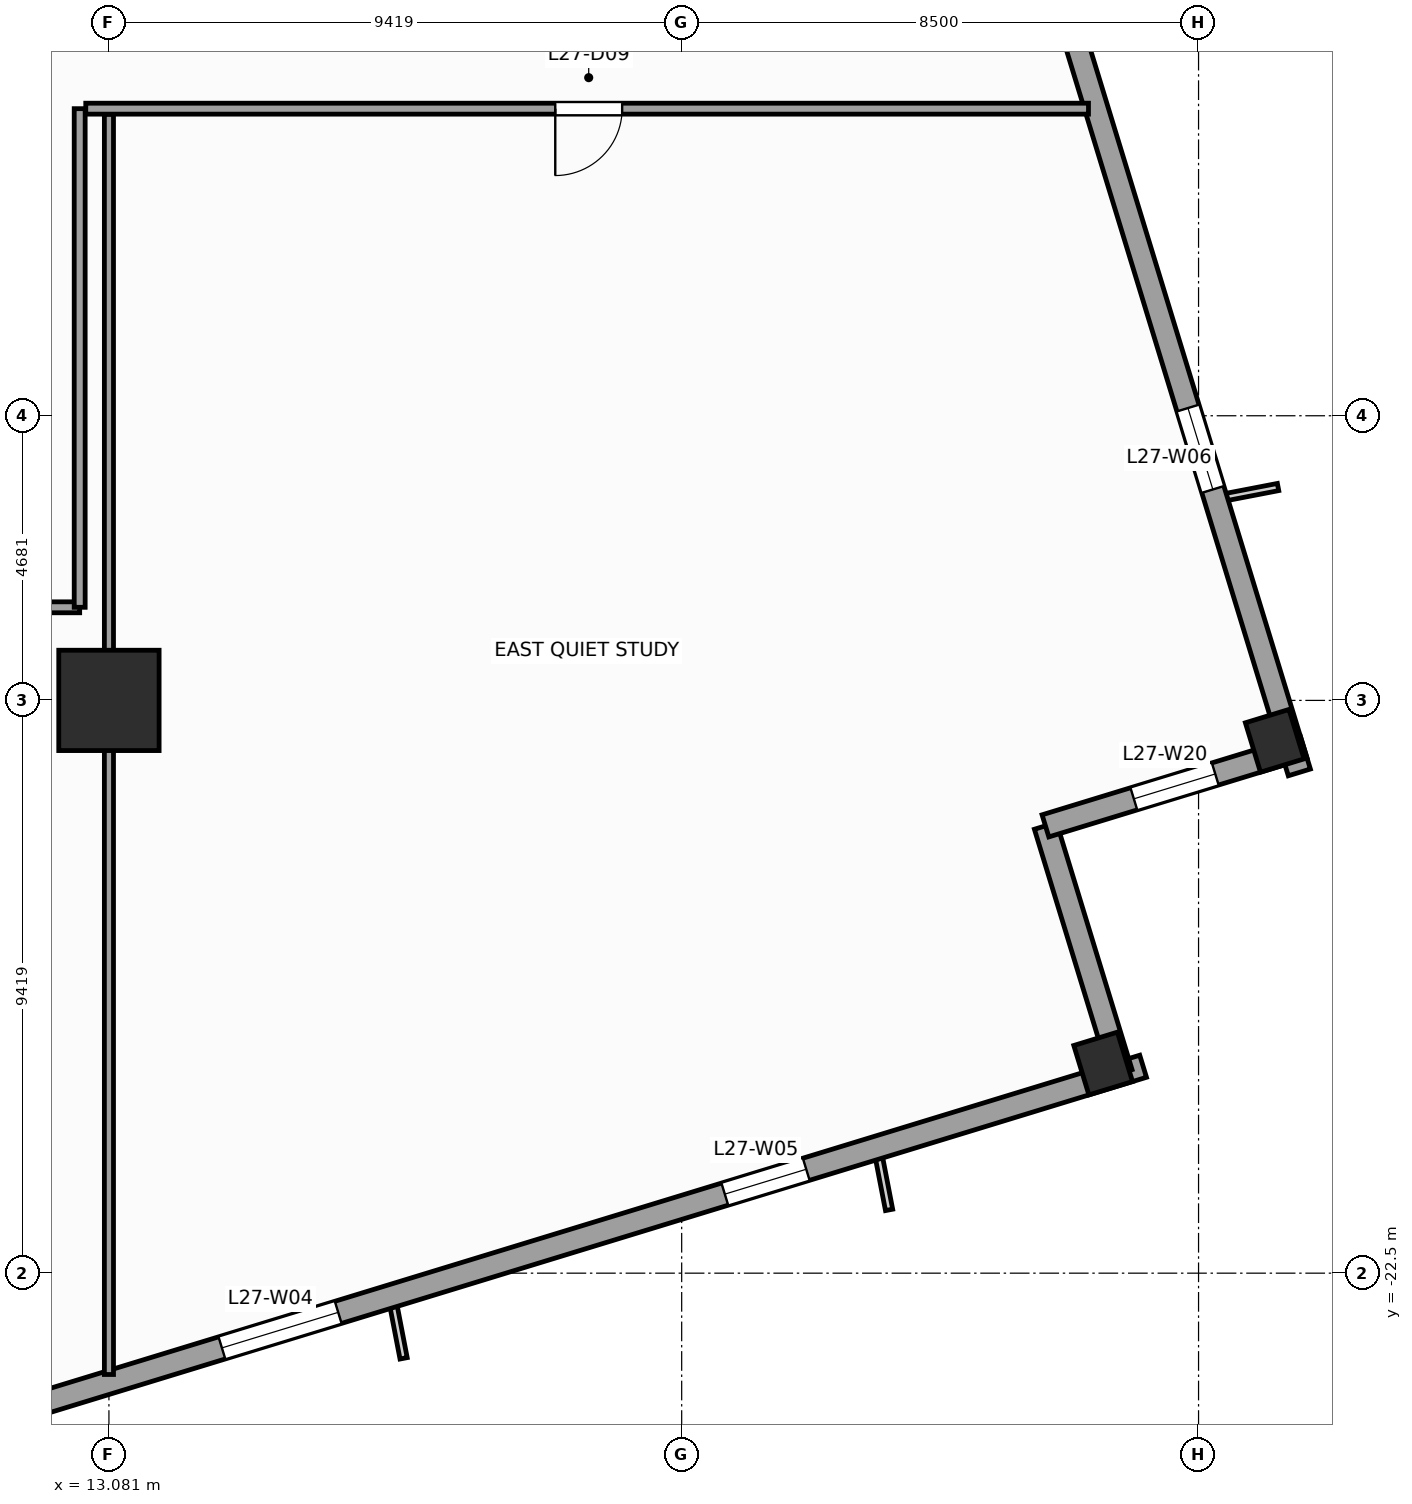
"""IFC4 building model, lengths in metres.
Left out: names, types, materials, properties, quantities, classifications, styles, units other than length and angle.
Written with IfcOpenShell. Run it as: python <this file> out.ifc"""

import sys

from ifc_helpers import new_model, si_unit, direction, frame, frame_2d, origin, origin_2d, place, context, subcontext, project, spatial, rectangle, extrude, source, transform, mapped, element, fill, save


model = new_model("IFC4")
c1 = context("Model", 3, precision=1e-05, world=origin(), true_north=direction((0.0, 1.0)))
c2 = subcontext(c1, "Body", "Model", "MODEL_VIEW")
j1 = project(units=[si_unit("LENGTHUNIT", "METRE"), si_unit("PLANEANGLEUNIT", "RADIAN")], contexts=[c1])
p1 = place(None, origin())
s1 = spatial("IfcSite", under=j1, at=p1, CompositionType="ELEMENT")
p2 = place(p1, origin())
s2 = spatial("IfcBuilding", under=s1, at=p2, CompositionType="ELEMENT")
p3 = place(p2, frame((0.0, 0.0, 115.2)))
s3 = spatial("IfcBuildingStorey", under=s2, at=p3, CompositionType="ELEMENT", Elevation=115.2)
m1 = source(origin(), c2, "Body", "SweptSolid", [
    extrude(rectangle(XDim=1.65, YDim=1.65, at=origin_2d()), origin(), (0.0, 0.0, 1.0), 4.0),
])
p4 = place(p3, frame((13.081, -13.081, 0.0), z_axis=(0.0, 0.0, 1.0), x_axis=(1.0, 0.0, 0.0)))
e1 = element("IfcColumn", 1, at=p4, inside=s3, PredefinedType="COLUMN", context=c2, shape_type="MappedRepresentation", body=[
    mapped(m1, transform((0.0, 0.0, 0.0), scale=1.0)),
])
m2 = source(origin(), c2, "Body", "SweptSolid", [
    extrude(rectangle(XDim=0.75, YDim=0.85, at=origin_2d()), origin(), (0.0, 0.0, 1.0), 4.0),
])
for number, where, z_axis, x_axis in (
    (2, (29.431, -19.052, 0.0), (0.0, 0.0, 1.0), (0.956, 0.292, 0.0)),
    (3, (32.253, -13.746, 0.0), (0.0, 0.0, 1.0), (0.956, 0.292, 0.0)),
):
    element("IfcColumn", number, at=place(p3, frame(where, z_axis=z_axis, x_axis=x_axis)), inside=s3, PredefinedType="COLUMN", context=c2, shape_type="MappedRepresentation", body=[
        mapped(m2, transform((0.0, 0.0, 0.0), scale=1.0)),
    ])
p5 = place(p3, frame((-14.265, -32.658, 0.0), z_axis=(0.0, 0.0, 1.0), x_axis=(0.956304320851, 0.292373127906, 0.0)))
e4 = element("IfcWall", 4, at=p5, inside=s3, PredefinedType="STANDARD", context=c2, shape_type="SweptSolid", body=[
    extrude(rectangle(XDim=46.38, YDim=0.38, at=frame_2d((23.19, 0.0))), origin(), (0.0, 0.0, 1.0), 3.14),
])
p6 = place(p5, frame((17.065, 0.0, 0.0)))
e5 = element("IfcOpeningElement", 5, at=p6, cuts=e4, PredefinedType="OPENING", context=c2, shape_type="SweptSolid", body=[
    extrude(rectangle(XDim=1.05, YDim=2.25, at=frame_2d((0.525, 1.125))), frame((0.0, 0.2, 0.0), z_axis=(0.0, -1.0, 0.0), x_axis=(1.0, 0.0, 0.0)), (0.0, 0.0, 1.0), 0.4),
])
p7 = place(p5, frame((4.865, 0.0, 0.51)))
e6 = element("IfcOpeningElement", 6, at=p7, cuts=e4, PredefinedType="OPENING", context=c2, shape_type="SweptSolid", body=[
    extrude(rectangle(XDim=1.4, YDim=2.4, at=frame_2d((0.7, 1.2))), frame((0.0, 0.2, 0.0), z_axis=(0.0, -1.0, 0.0), x_axis=(1.0, 0.0, 0.0)), (0.0, 0.0, 1.0), 0.4),
])
p8 = place(p5, frame((10.95, 0.0, 0.51)))
e7 = element("IfcOpeningElement", 7, at=p8, cuts=e4, PredefinedType="OPENING", context=c2, shape_type="SweptSolid", body=[
    extrude(rectangle(XDim=2.0, YDim=2.4, at=frame_2d((1.0, 1.2))), frame((0.0, 0.2, 0.0), z_axis=(0.0, -1.0, 0.0), x_axis=(1.0, 0.0, 0.0)), (0.0, 0.0, 1.0), 0.4),
])
p9 = place(p5, frame((20.512, 0.0, 0.51)))
e8 = element("IfcOpeningElement", 8, at=p9, cuts=e4, PredefinedType="OPENING", context=c2, shape_type="SweptSolid", body=[
    extrude(rectangle(XDim=2.0, YDim=2.4, at=frame_2d((1.0, 1.2))), frame((0.0, 0.2, 0.0), z_axis=(0.0, -1.0, 0.0), x_axis=(1.0, 0.0, 0.0)), (0.0, 0.0, 1.0), 0.4),
])
p10 = place(p5, frame((30.538, 0.0, 0.51)))
e9 = element("IfcOpeningElement", 9, at=p10, cuts=e4, PredefinedType="OPENING", context=c2, shape_type="SweptSolid", body=[
    extrude(rectangle(XDim=2.0, YDim=2.4, at=frame_2d((1.0, 1.2))), frame((0.0, 0.2, 0.0), z_axis=(0.0, -1.0, 0.0), x_axis=(1.0, 0.0, 0.0)), (0.0, 0.0, 1.0), 0.4),
])
p11 = place(p5, frame((39.187, 0.0, 0.51)))
e10 = element("IfcOpeningElement", 10, at=p11, cuts=e4, PredefinedType="OPENING", context=c2, shape_type="SweptSolid", body=[
    extrude(rectangle(XDim=1.4, YDim=2.4, at=frame_2d((0.7, 1.2))), frame((0.0, 0.2, 0.0), z_axis=(0.0, -1.0, 0.0), x_axis=(1.0, 0.0, 0.0)), (0.0, 0.0, 1.0), 0.4),
])
p12 = place(p3, frame((29.725, -19.208, 0.0), z_axis=(0.0, 0.0, 1.0), x_axis=(-0.292345507338, 0.956312764915, 0.0)))
e11 = element("IfcWall", 11, at=p12, inside=s3, PredefinedType="STANDARD", context=c2, shape_type="SweptSolid", body=[
    extrude(rectangle(XDim=4.25, YDim=0.38, at=frame_2d((2.125, 0.0))), origin(), (0.0, 0.0, 1.0), 3.74),
])
p13 = place(p3, frame((28.482, -15.144, 0.0), z_axis=(0.0, 0.0, 1.0), x_axis=(0.956304176051, 0.292373601522, 0.0)))
e12 = element("IfcWall", 12, at=p13, inside=s3, PredefinedType="STANDARD", context=c2, shape_type="SweptSolid", body=[
    extrude(rectangle(XDim=4.44, YDim=0.38, at=frame_2d((2.22, 0.0))), origin(), (0.0, 0.0, 1.0), 3.04),
])
p14 = place(p13, frame((1.52, 0.0, 0.51)))
e13 = element("IfcOpeningElement", 13, at=p14, cuts=e12, PredefinedType="OPENING", context=c2, shape_type="SweptSolid", body=[
    extrude(rectangle(XDim=1.4, YDim=2.4, at=frame_2d((0.7, 1.2))), frame((0.0, 0.2, 0.0), z_axis=(0.0, -1.0, 0.0), x_axis=(1.0, 0.0, 0.0)), (0.0, 0.0, 1.0), 0.4),
])
p15 = place(p3, frame((32.658, -14.265, 0.0), z_axis=(0.0, 0.0, 1.0), x_axis=(-0.292373127906, 0.956304320851, 0.0)))
e14 = element("IfcWall", 14, at=p15, inside=s3, PredefinedType="STANDARD", context=c2, shape_type="SweptSolid", body=[
    extrude(rectangle(XDim=46.38, YDim=0.38, at=frame_2d((23.19, 0.0))), origin(), (0.0, 0.0, 1.0), 3.14),
])
p16 = place(p15, frame((4.865, 0.0, 0.51)))
e15 = element("IfcOpeningElement", 15, at=p16, cuts=e14, PredefinedType="OPENING", context=c2, shape_type="SweptSolid", body=[
    extrude(rectangle(XDim=1.4, YDim=2.4, at=frame_2d((0.7, 1.2))), frame((0.0, 0.2, 0.0), z_axis=(0.0, -1.0, 0.0), x_axis=(1.0, 0.0, 0.0)), (0.0, 0.0, 1.0), 0.4),
])
p17 = place(p15, frame((14.7, 0.0, 0.51)))
e16 = element("IfcOpeningElement", 16, at=p17, cuts=e14, PredefinedType="OPENING", context=c2, shape_type="SweptSolid", body=[
    extrude(rectangle(XDim=2.0, YDim=2.4, at=frame_2d((1.0, 1.2))), frame((0.0, 0.2, 0.0), z_axis=(0.0, -1.0, 0.0), x_axis=(1.0, 0.0, 0.0)), (0.0, 0.0, 1.0), 0.4),
])
p18 = place(p15, frame((20.512, 0.0, 0.51)))
e17 = element("IfcOpeningElement", 17, at=p18, cuts=e14, PredefinedType="OPENING", context=c2, shape_type="SweptSolid", body=[
    extrude(rectangle(XDim=2.0, YDim=2.4, at=frame_2d((1.0, 1.2))), frame((0.0, 0.2, 0.0), z_axis=(0.0, -1.0, 0.0), x_axis=(1.0, 0.0, 0.0)), (0.0, 0.0, 1.0), 0.4),
])
p19 = place(p15, frame((30.538, 0.0, 0.51)))
e18 = element("IfcOpeningElement", 18, at=p19, cuts=e14, PredefinedType="OPENING", context=c2, shape_type="SweptSolid", body=[
    extrude(rectangle(XDim=2.0, YDim=2.4, at=frame_2d((1.0, 1.2))), frame((0.0, 0.2, 0.0), z_axis=(0.0, -1.0, 0.0), x_axis=(1.0, 0.0, 0.0)), (0.0, 0.0, 1.0), 0.4),
])
p20 = place(p15, frame((39.187, 0.0, 0.51)))
e19 = element("IfcOpeningElement", 19, at=p20, cuts=e14, PredefinedType="OPENING", context=c2, shape_type="SweptSolid", body=[
    extrude(rectangle(XDim=1.4, YDim=2.4, at=frame_2d((0.7, 1.2))), frame((0.0, 0.2, 0.0), z_axis=(0.0, -1.0, 0.0), x_axis=(1.0, 0.0, 0.0)), (0.0, 0.0, 1.0), 0.4),
])
p21 = place(p3, frame((1.15, -11.55, 0.0), z_axis=(0.0, 0.0, 1.0), x_axis=(1.0, 0.0, 0.0)))
e20 = element("IfcWall", 20, at=p21, inside=s3, PredefinedType="PARTITIONING", context=c2, shape_type="SweptSolid", body=[
    extrude(rectangle(XDim=11.45, YDim=0.18, at=frame_2d((5.725, 0.0))), origin(), (0.0, 0.0, 1.0), 3.74),
])
p22 = place(p21, frame((5.0, 0.0, 0.0)))
e21 = element("IfcOpeningElement", 21, at=p22, cuts=e20, PredefinedType="OPENING", context=c2, shape_type="SweptSolid", body=[
    extrude(rectangle(XDim=1.1, YDim=2.2, at=frame_2d((0.55, 1.1))), frame((0.0, 0.1, 0.0), z_axis=(0.0, -1.0, 0.0), x_axis=(1.0, 0.0, 0.0)), (0.0, 0.0, 1.0), 0.2),
])
p23 = place(p21, frame((8.736, 0.0, 0.0)))
e22 = element("IfcOpeningElement", 22, at=p23, cuts=e20, PredefinedType="OPENING", context=c2, shape_type="SweptSolid", body=[
    extrude(rectangle(XDim=1.1, YDim=2.2, at=frame_2d((0.55, 1.1))), frame((0.0, 0.1, 0.0), z_axis=(0.0, -1.0, 0.0), x_axis=(1.0, 0.0, 0.0)), (0.0, 0.0, 1.0), 0.2),
])
p24 = place(p3, frame((12.6, -11.55, 0.0), z_axis=(0.0, 0.0, 1.0), x_axis=(0.0, 1.0, 0.0)))
e23 = element("IfcWall", 23, at=p24, inside=s3, PredefinedType="PARTITIONING", context=c2, shape_type="SweptSolid", body=[
    extrude(rectangle(XDim=8.2, YDim=0.18, at=frame_2d((4.1, 0.0))), origin(), (0.0, 0.0, 1.0), 3.74),
])
p25 = place(p3, frame((12.7, -3.35, 0.0), z_axis=(0.0, 0.0, 1.0), x_axis=(1.0, 0.0, 0.0)))
e24 = element("IfcWall", 24, at=p25, inside=s3, PredefinedType="PARTITIONING", context=c2, shape_type="SweptSolid", body=[
    extrude(rectangle(XDim=16.49, YDim=0.18, at=frame_2d((8.245, 0.0))), origin(), (0.0, 0.0, 1.0), 3.74),
])
p26 = place(p25, frame((7.721, 0.0, 0.0)))
e25 = element("IfcOpeningElement", 25, at=p26, cuts=e24, PredefinedType="OPENING", context=c2, shape_type="SweptSolid", body=[
    extrude(rectangle(XDim=1.1, YDim=2.2, at=frame_2d((0.55, 1.1))), frame((0.0, 0.1, 0.0), z_axis=(0.0, -1.0, 0.0), x_axis=(1.0, 0.0, 0.0)), (0.0, 0.0, 1.0), 0.2),
])
p27 = place(p3, frame((13.081, -24.167, 0.0), z_axis=(0.0, 0.0, 1.0), x_axis=(0.0, 1.0, 0.0)))
e26 = element("IfcWall", 26, at=p27, inside=s3, PredefinedType="PARTITIONING", context=c2, shape_type="SweptSolid", body=[
    extrude(rectangle(XDim=20.721, YDim=0.15, at=frame_2d((10.361, 0.0))), origin(), (0.0, 0.0, 1.0), 2.732),
])
m3 = source(origin(), c2, "Body", "SweptSolid", [
    extrude(rectangle(XDim=2.0, YDim=2.4, at=frame_2d((1.0, 1.2))), frame((0.0, 0.03, 0.0), z_axis=(0.0, -1.0, 0.0), x_axis=(1.0, 0.0, 0.0)), (0.0, 0.0, 1.0), 0.06),
])
p28 = place(p10, origin())
e27 = element("IfcWindow", 27, at=p28, inside=s3, PartitioningType="SINGLE_PANEL", PredefinedType="WINDOW", context=c2, shape_type="MappedRepresentation", body=[
    mapped(m3, transform((0.0, 0.0, 0.0), scale=1.0)),
])
fill(e9, e27)
m4 = source(origin(), c2, "Body", "SweptSolid", [
    extrude(rectangle(XDim=1.4, YDim=2.4, at=frame_2d((0.7, 1.2))), frame((0.0, 0.03, 0.0), z_axis=(0.0, -1.0, 0.0), x_axis=(1.0, 0.0, 0.0)), (0.0, 0.0, 1.0), 0.06),
])
p29 = place(p11, origin())
e28 = element("IfcWindow", 28, at=p29, inside=s3, PartitioningType="SINGLE_PANEL", PredefinedType="WINDOW", context=c2, shape_type="MappedRepresentation", body=[
    mapped(m4, transform((0.0, 0.0, 0.0), scale=1.0)),
])
fill(e10, e28)
p30 = place(p16, origin())
e29 = element("IfcWindow", 29, at=p30, inside=s3, PartitioningType="SINGLE_PANEL", PredefinedType="WINDOW", context=c2, shape_type="MappedRepresentation", body=[
    mapped(m4, transform((0.0, 0.0, 0.0), scale=1.0)),
])
fill(e15, e29)
p31 = place(p14, origin())
e30 = element("IfcWindow", 30, at=p31, inside=s3, PartitioningType="SINGLE_PANEL", PredefinedType="WINDOW", context=c2, shape_type="MappedRepresentation", body=[
    mapped(m4, transform((0.0, 0.0, 0.0), scale=1.0)),
])
fill(e13, e30)
m5 = source(origin(), c2, "Body", "SweptSolid", [
    extrude(rectangle(XDim=1.1, YDim=2.2, at=frame_2d((0.55, 1.1))), frame((0.0, 0.025, 0.0), z_axis=(0.0, -1.0, 0.0), x_axis=(1.0, 0.0, 0.0)), (0.0, 0.0, 1.0), 0.05),
])
p32 = place(p26, frame((1.1, 0.0, 0.0), z_axis=(0.0, 0.0, 1.0), x_axis=(-1.0, 0.0, 0.0)))
e31 = element("IfcDoor", 31, at=p32, inside=s3, OperationType="SINGLE_SWING_LEFT", PredefinedType="DOOR", context=c2, shape_type="MappedRepresentation", body=[
    mapped(m5, transform((0.0, 0.0, 0.0), scale=1.0)),
])
fill(e25, e31)
save(model, sys.argv[1])
